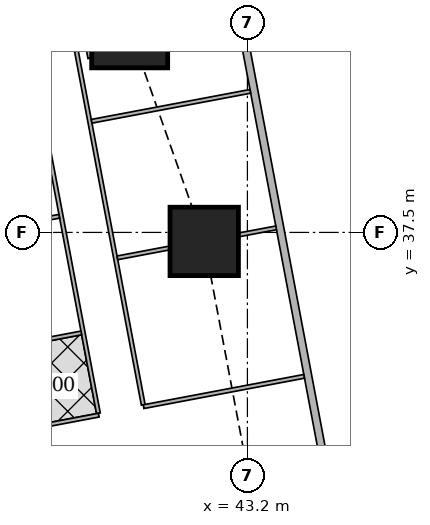
"""IFC4 building model, lengths in metres.
Left out: names, types, materials, properties, quantities, classifications, styles, units other than length and angle.
Written with IfcOpenShell. Run it as: python <this file> out.ifc"""

import sys

from ifc_helpers import new_model, si_unit, direction, frame, frame_2d, origin, origin_2d, place, context, subcontext, project, spatial, rectangle, extrude, element, fill, save


model = new_model("IFC4")
c1 = context("Model", 3, precision=1e-05, world=origin(), true_north=direction((0.0, 1.0)))
c2 = subcontext(c1, "Body", "Model", "MODEL_VIEW")
j1 = project(units=[si_unit("LENGTHUNIT", "METRE"), si_unit("PLANEANGLEUNIT", "RADIAN")], contexts=[c1])
p1 = place(None, origin())
s1 = spatial("IfcSite", under=j1, at=p1, CompositionType="ELEMENT")
p2 = place(p1, origin())
s2 = spatial("IfcBuilding", under=s1, at=p2, CompositionType="ELEMENT")
p3 = place(p2, frame((0.0, 0.0, 147.05)))
s3 = spatial("IfcBuildingStorey", under=s2, at=p3, CompositionType="ELEMENT", Elevation=147.05)
p4 = place(p3, frame((42.064, 37.263, 0.0), z_axis=(0.0, 0.0, 1.0), x_axis=(1.0, 0.0, 0.0)))
e1 = element("IfcColumn", 1, at=p4, inside=s3, PredefinedType="COLUMN", context=c2, shape_type="SweptSolid", body=[
    extrude(rectangle(XDim=1.8, YDim=1.8, at=origin_2d()), origin(), (0.0, 0.0, 1.0), 3.75),
])
p5 = place(p3, frame((40.102, 42.83, 0.0), z_axis=(0.0, 0.0, 1.0), x_axis=(1.0, 0.0, 0.0)))
e2 = element("IfcColumn", 2, at=p5, inside=s3, PredefinedType="COLUMN", context=c2, shape_type="SweptSolid", body=[
    extrude(rectangle(XDim=2.0, YDim=2.0, at=origin_2d()), origin(), (0.0, 0.0, 1.0), 3.75),
])
p6 = place(p3, frame((50.653, 2.703, 0.0), z_axis=(0.0, 0.0, 1.0), x_axis=(-0.185612026696, 0.982623109613, 0.0)))
e3 = element("IfcWall", 3, at=p6, inside=s3, PredefinedType="SOLIDWALL", context=c2, shape_type="SweptSolid", body=[
    extrude(rectangle(XDim=41.393, YDim=0.2, at=frame_2d((20.697, 0.0))), origin(), (0.0, 0.0, 1.0), 3.5),
])
p7 = place(p6, frame((1.633, 0.0, 0.9)))
e4 = element("IfcOpeningElement", 4, at=p7, cuts=e3, PredefinedType="OPENING", context=c2, shape_type="SweptSolid", body=[
    extrude(rectangle(XDim=1.8, YDim=1.5, at=frame_2d((0.9, 0.75))), frame((0.0, 0.11, 0.0), z_axis=(0.0, -1.0, 0.0), x_axis=(1.0, 0.0, 0.0)), (0.0, 0.0, 1.0), 0.22),
])
p8 = place(p6, frame((6.032, 0.0, 0.9)))
e5 = element("IfcOpeningElement", 5, at=p8, cuts=e3, PredefinedType="OPENING", context=c2, shape_type="SweptSolid", body=[
    extrude(rectangle(XDim=1.8, YDim=1.5, at=frame_2d((0.9, 0.75))), frame((0.0, 0.11, 0.0), z_axis=(0.0, -1.0, 0.0), x_axis=(1.0, 0.0, 0.0)), (0.0, 0.0, 1.0), 0.22),
])
p9 = place(p6, frame((9.848, 0.0, 0.9)))
e6 = element("IfcOpeningElement", 6, at=p9, cuts=e3, PredefinedType="OPENING", context=c2, shape_type="SweptSolid", body=[
    extrude(rectangle(XDim=1.8, YDim=1.5, at=frame_2d((0.9, 0.75))), frame((0.0, 0.11, 0.0), z_axis=(0.0, -1.0, 0.0), x_axis=(1.0, 0.0, 0.0)), (0.0, 0.0, 1.0), 0.22),
])
p10 = place(p6, frame((13.664, 0.0, 0.9)))
e7 = element("IfcOpeningElement", 7, at=p10, cuts=e3, PredefinedType="OPENING", context=c2, shape_type="SweptSolid", body=[
    extrude(rectangle(XDim=1.8, YDim=1.5, at=frame_2d((0.9, 0.75))), frame((0.0, 0.11, 0.0), z_axis=(0.0, -1.0, 0.0), x_axis=(1.0, 0.0, 0.0)), (0.0, 0.0, 1.0), 0.22),
])
p11 = place(p6, frame((17.481, 0.0, 0.9)))
e8 = element("IfcOpeningElement", 8, at=p11, cuts=e3, PredefinedType="OPENING", context=c2, shape_type="SweptSolid", body=[
    extrude(rectangle(XDim=1.8, YDim=1.5, at=frame_2d((0.9, 0.75))), frame((0.0, 0.11, 0.0), z_axis=(0.0, -1.0, 0.0), x_axis=(1.0, 0.0, 0.0)), (0.0, 0.0, 1.0), 0.22),
])
p12 = place(p6, frame((21.297, 0.0, 0.9)))
e9 = element("IfcOpeningElement", 9, at=p12, cuts=e3, PredefinedType="OPENING", context=c2, shape_type="SweptSolid", body=[
    extrude(rectangle(XDim=1.8, YDim=1.5, at=frame_2d((0.9, 0.75))), frame((0.0, 0.11, 0.0), z_axis=(0.0, -1.0, 0.0), x_axis=(1.0, 0.0, 0.0)), (0.0, 0.0, 1.0), 0.22),
])
p13 = place(p6, frame((25.113, 0.0, 0.9)))
e10 = element("IfcOpeningElement", 10, at=p13, cuts=e3, PredefinedType="OPENING", context=c2, shape_type="SweptSolid", body=[
    extrude(rectangle(XDim=1.8, YDim=1.5, at=frame_2d((0.9, 0.75))), frame((0.0, 0.11, 0.0), z_axis=(0.0, -1.0, 0.0), x_axis=(1.0, 0.0, 0.0)), (0.0, 0.0, 1.0), 0.22),
])
p14 = place(p6, frame((28.93, 0.0, 0.9)))
e11 = element("IfcOpeningElement", 11, at=p14, cuts=e3, PredefinedType="OPENING", context=c2, shape_type="SweptSolid", body=[
    extrude(rectangle(XDim=1.8, YDim=1.5, at=frame_2d((0.9, 0.75))), frame((0.0, 0.11, 0.0), z_axis=(0.0, -1.0, 0.0), x_axis=(1.0, 0.0, 0.0)), (0.0, 0.0, 1.0), 0.22),
])
p15 = place(p6, frame((32.746, 0.0, 0.9)))
e12 = element("IfcOpeningElement", 12, at=p15, cuts=e3, PredefinedType="OPENING", context=c2, shape_type="SweptSolid", body=[
    extrude(rectangle(XDim=1.8, YDim=1.5, at=frame_2d((0.9, 0.75))), frame((0.0, 0.11, 0.0), z_axis=(0.0, -1.0, 0.0), x_axis=(1.0, 0.0, 0.0)), (0.0, 0.0, 1.0), 0.22),
])
p16 = place(p6, frame((36.481, 0.0, 0.9)))
e13 = element("IfcOpeningElement", 13, at=p16, cuts=e3, PredefinedType="OPENING", context=c2, shape_type="SweptSolid", body=[
    extrude(rectangle(XDim=1.8, YDim=1.5, at=frame_2d((0.9, 0.75))), frame((0.0, 0.11, 0.0), z_axis=(0.0, -1.0, 0.0), x_axis=(1.0, 0.0, 0.0)), (0.0, 0.0, 1.0), 0.22),
])
p17 = place(p3, frame((33.877, 43.029, 0.0), z_axis=(0.0, 0.0, 1.0), x_axis=(0.185596841028, -0.98262597798, 0.0)))
e14 = element("IfcWall", 14, at=p17, inside=s3, PredefinedType="SOLIDWALL", context=c2, shape_type="SweptSolid", body=[
    extrude(rectangle(XDim=41.66, YDim=0.15, at=frame_2d((20.83, 0.0))), origin(), (0.0, 0.0, 1.0), 2.5),
])
p18 = place(p17, frame((12.57, 0.0, 0.0)))
e15 = element("IfcOpeningElement", 15, at=p18, cuts=e14, PredefinedType="OPENING", context=c2, shape_type="SweptSolid", body=[
    extrude(rectangle(XDim=1.0, YDim=2.1, at=frame_2d((0.5, 1.05))), frame((0.0, 0.085, 0.0), z_axis=(0.0, -1.0, 0.0), x_axis=(1.0, 0.0, 0.0)), (0.0, 0.0, 1.0), 0.17),
])
p19 = place(p17, frame((16.386, 0.0, 0.0)))
e16 = element("IfcOpeningElement", 16, at=p19, cuts=e14, PredefinedType="OPENING", context=c2, shape_type="SweptSolid", body=[
    extrude(rectangle(XDim=1.0, YDim=2.1, at=frame_2d((0.5, 1.05))), frame((0.0, 0.085, 0.0), z_axis=(0.0, -1.0, 0.0), x_axis=(1.0, 0.0, 0.0)), (0.0, 0.0, 1.0), 0.17),
])
p20 = place(p17, frame((31.166, 0.0, 0.0)))
e17 = element("IfcOpeningElement", 17, at=p20, cuts=e14, PredefinedType="OPENING", context=c2, shape_type="SweptSolid", body=[
    extrude(rectangle(XDim=1.0, YDim=2.1, at=frame_2d((0.5, 1.05))), frame((0.0, 0.085, 0.0), z_axis=(0.0, -1.0, 0.0), x_axis=(1.0, 0.0, 0.0)), (0.0, 0.0, 1.0), 0.17),
])
p21 = place(p3, frame((39.054, 42.085, 0.0), z_axis=(0.0, 0.0, 1.0), x_axis=(-0.185791584218, 0.982589175207, 0.0)))
e18 = element("IfcWall", 18, at=p21, inside=s3, PredefinedType="PARTITIONING", context=c2, shape_type="SweptSolid", body=[
    extrude(rectangle(XDim=3.628, YDim=0.1, at=frame_2d((1.814, 0.0))), origin(), (0.0, 0.0, 1.0), 2.1),
])
p22 = place(p3, frame((38.701, 42.27, 0.0), z_axis=(0.0, 0.0, 1.0), x_axis=(0.185634707842, -0.982618825, 0.0)))
e19 = element("IfcWall", 19, at=p22, inside=s3, PredefinedType="PARTITIONING", context=c2, shape_type="SweptSolid", body=[
    extrude(rectangle(XDim=9.47, YDim=0.1, at=frame_2d((4.735, 0.0))), origin(), (0.0, 0.0, 1.0), 3.5),
])
p23 = place(p22, frame((8.42, 0.0, 0.0)))
e20 = element("IfcOpeningElement", 20, at=p23, cuts=e19, PredefinedType="OPENING", context=c2, shape_type="SweptSolid", body=[
    extrude(rectangle(XDim=0.9, YDim=2.1, at=frame_2d((0.45, 1.05))), frame((0.0, 0.06, 0.0), z_axis=(0.0, -1.0, 0.0), x_axis=(1.0, 0.0, 0.0)), (0.0, 0.0, 1.0), 0.12),
])
p24 = place(p22, frame((4.444, 0.0, 0.0)))
e21 = element("IfcOpeningElement", 21, at=p24, cuts=e19, PredefinedType="OPENING", context=c2, shape_type="SweptSolid", body=[
    extrude(rectangle(XDim=0.9, YDim=2.1, at=frame_2d((0.45, 1.05))), frame((0.0, 0.06, 0.0), z_axis=(0.0, -1.0, 0.0), x_axis=(1.0, 0.0, 0.0)), (0.0, 0.0, 1.0), 0.12),
])
p25 = place(p3, frame((37.411, 42.638, 0.0), z_axis=(0.0, 0.0, 1.0), x_axis=(0.185485587071, -0.982646984928, 0.0)))
e22 = element("IfcWall", 22, at=p25, inside=s3, PredefinedType="PARTITIONING", context=c2, shape_type="SweptSolid", body=[
    extrude(rectangle(XDim=10.072, YDim=0.1, at=frame_2d((5.036, 0.0))), origin(), (0.0, 0.0, 1.0), 3.5),
])
p26 = place(p25, frame((8.567, 0.0, 0.0)))
e23 = element("IfcOpeningElement", 23, at=p26, cuts=e22, PredefinedType="OPENING", context=c2, shape_type="SweptSolid", body=[
    extrude(rectangle(XDim=0.9, YDim=2.1, at=frame_2d((0.45, 1.05))), frame((0.0, 0.06, 0.0), z_axis=(0.0, -1.0, 0.0), x_axis=(1.0, 0.0, 0.0)), (0.0, 0.0, 1.0), 0.12),
])
p27 = place(p25, frame((3.188, 0.0, 0.0)))
e24 = element("IfcOpeningElement", 24, at=p27, cuts=e22, PredefinedType="OPENING", context=c2, shape_type="SweptSolid", body=[
    extrude(rectangle(XDim=0.9, YDim=2.1, at=frame_2d((0.45, 1.05))), frame((0.0, 0.06, 0.0), z_axis=(0.0, -1.0, 0.0), x_axis=(1.0, 0.0, 0.0)), (0.0, 0.0, 1.0), 0.12),
])
p28 = place(p25, frame((1.129, 0.0, 0.0)))
e25 = element("IfcOpeningElement", 25, at=p28, cuts=e22, PredefinedType="OPENING", context=c2, shape_type="SweptSolid", body=[
    extrude(rectangle(XDim=0.9, YDim=2.1, at=frame_2d((0.45, 1.05))), frame((0.0, 0.06, 0.0), z_axis=(0.0, -1.0, 0.0), x_axis=(1.0, 0.0, 0.0)), (0.0, 0.0, 1.0), 0.12),
])
p29 = place(p25, frame((5.899, 0.0, 0.0)))
e26 = element("IfcOpeningElement", 26, at=p29, cuts=e22, PredefinedType="OPENING", context=c2, shape_type="SweptSolid", body=[
    extrude(rectangle(XDim=0.9, YDim=2.1, at=frame_2d((0.45, 1.05))), frame((0.0, 0.06, 0.0), z_axis=(0.0, -1.0, 0.0), x_axis=(1.0, 0.0, 0.0)), (0.0, 0.0, 1.0), 0.12),
])
p30 = place(p3, frame((43.277, 41.212, 0.0), z_axis=(0.0, 0.0, 1.0), x_axis=(-0.982665405803, -0.185387972203, 0.0)))
e27 = element("IfcWall", 27, at=p30, inside=s3, PredefinedType="PARTITIONING", context=c2, shape_type="SweptSolid", body=[
    extrude(rectangle(XDim=4.25, YDim=0.1, at=frame_2d((2.125, 0.0))), origin(), (0.0, 0.0, 1.0), 2.1),
])
p31 = place(p3, frame((43.955, 37.62, 0.0), z_axis=(0.0, 0.0, 1.0), x_axis=(-0.982666697719, -0.185381124159, 0.0)))
e28 = element("IfcWall", 28, at=p31, inside=s3, PredefinedType="PARTITIONING", context=c2, shape_type="SweptSolid", body=[
    extrude(rectangle(XDim=0.998, YDim=0.1, at=frame_2d((0.499, 0.0))), origin(), (0.0, 0.0, 1.0), 3.5),
])
p32 = place(p3, frame((41.154, 37.091, 0.0), z_axis=(0.0, 0.0, 1.0), x_axis=(-0.982586605669, -0.185805173125, 0.0)))
e29 = element("IfcWall", 29, at=p32, inside=s3, PredefinedType="PARTITIONING", context=c2, shape_type="SweptSolid", body=[
    extrude(rectangle(XDim=1.399, YDim=0.1, at=frame_2d((0.7, 0.0))), origin(), (0.0, 0.0, 1.0), 3.5),
])
p33 = place(p3, frame((44.693, 33.713, 0.0), z_axis=(0.0, 0.0, 1.0), x_axis=(-0.982633535512, -0.185556823879, 0.0)))
e30 = element("IfcWall", 30, at=p33, inside=s3, PredefinedType="PARTITIONING", context=c2, shape_type="SweptSolid", body=[
    extrude(rectangle(XDim=4.3, YDim=0.1, at=frame_2d((2.15, 0.0))), origin(), (0.0, 0.0, 1.0), 2.1),
])
p34 = place(p3, frame((38.25, 37.925, 0.0), z_axis=(0.0, 0.0, 1.0), x_axis=(-0.982676595259, -0.18532865167, 0.0)))
e31 = element("IfcWall", 31, at=p34, inside=s3, PredefinedType="PARTITIONING", context=c2, shape_type="SweptSolid", body=[
    extrude(rectangle(XDim=1.516, YDim=0.1, at=frame_2d((0.758, 0.0))), origin(), (0.0, 0.0, 1.0), 3.5),
])
p35 = place(p3, frame((39.289, 32.692, 0.0), z_axis=(0.0, 0.0, 1.0), x_axis=(-0.982633623707, -0.185556356831, 0.0)))
e32 = element("IfcWall", 32, at=p35, inside=s3, PredefinedType="PARTITIONING", context=c2, shape_type="SweptSolid", body=[
    extrude(rectangle(XDim=3.325, YDim=0.1, at=frame_2d((1.663, 0.0))), origin(), (0.0, 0.0, 1.0), 3.5),
])
p36 = place(p3, frame((38.829, 34.855, 0.0), z_axis=(0.0, 0.0, 1.0), x_axis=(-0.982610347627, -0.185679575441, 0.0)))
e33 = element("IfcWall", 33, at=p36, inside=s3, PredefinedType="PARTITIONING", context=c2, shape_type="SweptSolid", body=[
    extrude(rectangle(XDim=3.274, YDim=0.1, at=frame_2d((1.637, 0.0))), origin(), (0.0, 0.0, 1.0), 3.5),
])
p37 = place(p14, origin())
e34 = element("IfcWindow", 34, at=p37, inside=s3, PartitioningType="SINGLE_PANEL", PredefinedType="WINDOW", context=c2, shape_type="SweptSolid", body=[
    extrude(rectangle(XDim=1.8, YDim=1.5, at=frame_2d((0.9, 0.75))), frame((0.0, 0.03, 0.0), z_axis=(0.0, -1.0, 0.0), x_axis=(1.0, 0.0, 0.0)), (0.0, 0.0, 1.0), 0.06),
])
fill(e11, e34)
p38 = place(p15, origin())
e35 = element("IfcWindow", 35, at=p38, inside=s3, PartitioningType="SINGLE_PANEL", PredefinedType="WINDOW", context=c2, shape_type="SweptSolid", body=[
    extrude(rectangle(XDim=1.8, YDim=1.5, at=frame_2d((0.9, 0.75))), frame((0.0, 0.03, 0.0), z_axis=(0.0, -1.0, 0.0), x_axis=(1.0, 0.0, 0.0)), (0.0, 0.0, 1.0), 0.06),
])
fill(e12, e35)
p39 = place(p16, origin())
e36 = element("IfcWindow", 36, at=p39, inside=s3, PartitioningType="SINGLE_PANEL", PredefinedType="WINDOW", context=c2, shape_type="SweptSolid", body=[
    extrude(rectangle(XDim=1.8, YDim=1.5, at=frame_2d((0.9, 0.75))), frame((0.0, 0.03, 0.0), z_axis=(0.0, -1.0, 0.0), x_axis=(1.0, 0.0, 0.0)), (0.0, 0.0, 1.0), 0.06),
])
fill(e13, e36)
p40 = place(p23, origin())
e37 = element("IfcDoor", 37, at=p40, inside=s3, OperationType="SINGLE_SWING_RIGHT", PredefinedType="DOOR", context=c2, shape_type="SweptSolid", body=[
    extrude(rectangle(XDim=0.9, YDim=2.1, at=frame_2d((0.45, 1.05))), frame((0.0, 0.025, 0.0), z_axis=(0.0, -1.0, 0.0), x_axis=(1.0, 0.0, 0.0)), (0.0, 0.0, 1.0), 0.05),
])
fill(e20, e37)
p41 = place(p24, origin())
e38 = element("IfcDoor", 38, at=p41, inside=s3, OperationType="SINGLE_SWING_RIGHT", PredefinedType="DOOR", context=c2, shape_type="SweptSolid", body=[
    extrude(rectangle(XDim=0.9, YDim=2.1, at=frame_2d((0.45, 1.05))), frame((0.0, 0.025, 0.0), z_axis=(0.0, -1.0, 0.0), x_axis=(1.0, 0.0, 0.0)), (0.0, 0.0, 1.0), 0.05),
])
fill(e21, e38)
p42 = place(p26, origin())
e39 = element("IfcDoor", 39, at=p42, inside=s3, OperationType="SINGLE_SWING_LEFT", PredefinedType="DOOR", context=c2, shape_type="SweptSolid", body=[
    extrude(rectangle(XDim=0.9, YDim=2.1, at=frame_2d((0.45, 1.05))), frame((0.0, 0.025, 0.0), z_axis=(0.0, -1.0, 0.0), x_axis=(1.0, 0.0, 0.0)), (0.0, 0.0, 1.0), 0.05),
])
fill(e23, e39)
p43 = place(p27, origin())
e40 = element("IfcDoor", 40, at=p43, inside=s3, OperationType="SINGLE_SWING_RIGHT", PredefinedType="DOOR", context=c2, shape_type="SweptSolid", body=[
    extrude(rectangle(XDim=0.9, YDim=2.1, at=frame_2d((0.45, 1.05))), frame((0.0, 0.025, 0.0), z_axis=(0.0, -1.0, 0.0), x_axis=(1.0, 0.0, 0.0)), (0.0, 0.0, 1.0), 0.05),
])
fill(e24, e40)
p44 = place(p29, origin())
e41 = element("IfcDoor", 41, at=p44, inside=s3, OperationType="SINGLE_SWING_LEFT", PredefinedType="DOOR", context=c2, shape_type="SweptSolid", body=[
    extrude(rectangle(XDim=0.9, YDim=2.1, at=frame_2d((0.45, 1.05))), frame((0.0, 0.025, 0.0), z_axis=(0.0, -1.0, 0.0), x_axis=(1.0, 0.0, 0.0)), (0.0, 0.0, 1.0), 0.05),
])
fill(e26, e41)
save(model, sys.argv[1])
